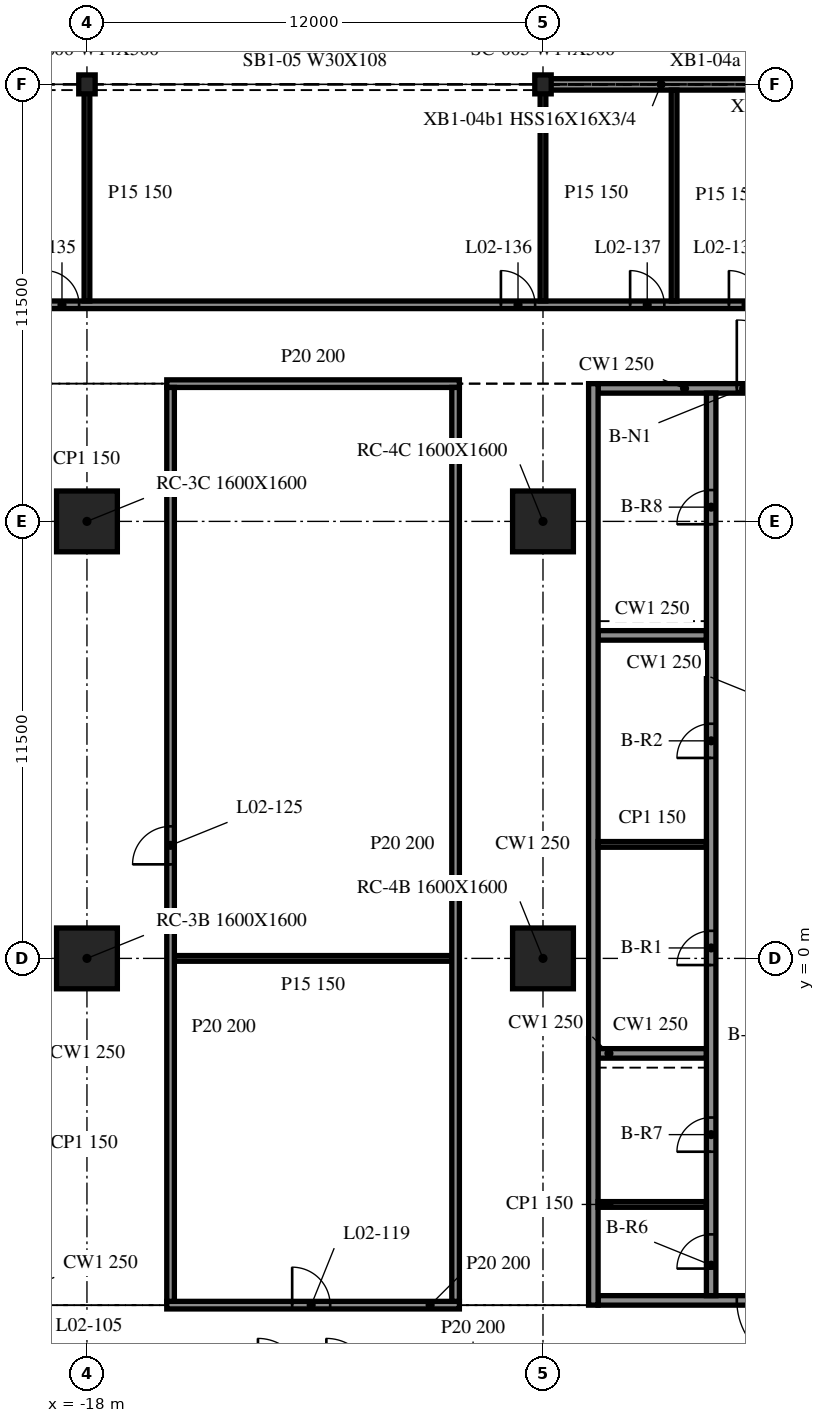
"""IFC4 building model, lengths in metres.
Left out: names, types, materials, properties, quantities, classifications, styles, units other than length and angle.
Written with IfcOpenShell. Run it as: python <this file> out.ifc"""

import sys

from ifc_helpers import new_model, si_unit, direction, frame, frame_2d, origin, origin_2d, place, context, subcontext, project, spatial, rectangle, i_section, extrude, element, fill, save


model = new_model("IFC4")
c1 = context("Model", 3, precision=1e-05, world=origin(), true_north=direction((0.0, 1.0)))
c2 = subcontext(c1, "Body", "Model", "MODEL_VIEW")
j1 = project(units=[si_unit("LENGTHUNIT", "METRE"), si_unit("PLANEANGLEUNIT", "RADIAN")], contexts=[c1])
p1 = place(None, origin())
s1 = spatial("IfcSite", under=j1, at=p1, CompositionType="ELEMENT")
p2 = place(p1, origin())
s2 = spatial("IfcBuilding", under=s1, at=p2, CompositionType="ELEMENT")
p3 = place(p2, frame((0.0, 0.0, 11.5)))
s3 = spatial("IfcBuildingStorey", under=s2, at=p3, CompositionType="ELEMENT", Elevation=11.5)
for number, where, z_axis, x_axis in (
    (1, (-18.0, 0.0, -0.34), (0.0, 0.0, 1.0), (1.0, 0.0, 0.0)),
    (2, (-18.0, 11.5, -0.34), (0.0, 0.0, 1.0), (1.0, 0.0, 0.0)),
    (3, (-6.0, 0.0, -0.34), (0.0, 0.0, 1.0), (1.0, 0.0, 0.0)),
    (4, (-6.0, 11.5, -0.34), (0.0, 0.0, 1.0), (1.0, 0.0, 0.0)),
):
    element("IfcColumn", number, at=place(p3, frame(where, z_axis=z_axis, x_axis=x_axis)), inside=s3, PredefinedType="COLUMN", context=c2, shape_type="SweptSolid", body=[
        extrude(rectangle(XDim=1.6, YDim=1.6, at=origin_2d()), origin(), (0.0, 0.0, 1.0), 4.3),
    ])
for number, where, z_axis, x_axis in (
    (5, (-6.0, 23.0, -0.34), (0.0, 0.0, 1.0), (1.0, 0.0, 0.0)),
    (6, (-18.0, 23.0, -0.34), (0.0, 0.0, 1.0), (1.0, 0.0, 0.0)),
):
    element("IfcColumn", number, at=place(p3, frame(where, z_axis=z_axis, x_axis=x_axis)), inside=s3, PredefinedType="COLUMN", context=c2, shape_type="SweptSolid", body=[
        extrude(i_section(OverallWidth=0.432, OverallDepth=0.498, WebThickness=0.056, FlangeThickness=0.089, at=origin_2d()), origin(), (0.0, 0.0, 1.0), 4.3),
    ])
p4 = place(p3, frame((5.972, 23.0, 0.0), z_axis=(0.0, 0.0, 1.0), x_axis=(-1.0, 0.0, 0.0)))
e7 = element("IfcWall", 7, at=p4, inside=s3, PredefinedType="NOTDEFINED", context=c2, shape_type="SweptSolid", body=[
    extrude(rectangle(XDim=11.944, YDim=0.3, at=frame_2d((5.972, 0.0))), origin(), (0.0, 0.0, 1.0), 3.203),
])
p5 = place(p3, frame((-4.675, 15.125, 0.0), z_axis=(0.0, 0.0, 1.0), x_axis=(0.0, -1.0, 0.0)))
e8 = element("IfcWall", 8, at=p5, inside=s3, PredefinedType="SOLIDWALL", context=c2, shape_type="SweptSolid", body=[
    extrude(rectangle(XDim=24.25, YDim=0.25, at=frame_2d((12.125, 0.0))), origin(), (0.0, 0.0, 1.0), 3.96),
])
p6 = place(p3, frame((4.55, -9.0, 0.0), z_axis=(0.0, 0.0, 1.0), x_axis=(-1.0, 0.0, 0.0)))
e9 = element("IfcWall", 9, at=p6, inside=s3, PredefinedType="SOLIDWALL", context=c2, shape_type="SweptSolid", body=[
    extrude(rectangle(XDim=9.1, YDim=0.25, at=frame_2d((4.55, 0.0))), origin(), (0.0, 0.0, 1.0), 3.96),
])
p7 = place(p6, frame((3.65, 0.0, 0.0)))
e10 = element("IfcOpeningElement", 10, at=p7, cuts=e9, PredefinedType="OPENING", context=c2, shape_type="SweptSolid", body=[
    extrude(rectangle(XDim=1.8, YDim=2.1, at=frame_2d((0.9, 1.05))), frame((0.0, 0.135, 0.0), z_axis=(0.0, -1.0, 0.0), x_axis=(1.0, 0.0, 0.0)), (0.0, 0.0, 1.0), 0.27),
])
p8 = place(p3, frame((-4.55, 15.0, 0.0), z_axis=(0.0, 0.0, 1.0), x_axis=(1.0, 0.0, 0.0)))
e11 = element("IfcWall", 11, at=p8, inside=s3, PredefinedType="SOLIDWALL", context=c2, shape_type="SweptSolid", body=[
    extrude(rectangle(XDim=9.1, YDim=0.25, at=frame_2d((4.55, 0.0))), origin(), (0.0, 0.0, 1.0), 3.96),
])
p9 = place(p8, frame((3.65, 0.0, 0.0)))
e12 = element("IfcOpeningElement", 12, at=p9, cuts=e11, PredefinedType="OPENING", context=c2, shape_type="SweptSolid", body=[
    extrude(rectangle(XDim=1.8, YDim=2.1, at=frame_2d((0.9, 1.05))), frame((0.0, 0.135, 0.0), z_axis=(0.0, -1.0, 0.0), x_axis=(1.0, 0.0, 0.0)), (0.0, 0.0, 1.0), 0.27),
])
p10 = place(p3, frame((-1.575, -8.875, 0.0), z_axis=(0.0, 0.0, 1.0), x_axis=(0.0, 1.0, 0.0)))
e13 = element("IfcWall", 13, at=p10, inside=s3, PredefinedType="SOLIDWALL", context=c2, shape_type="SweptSolid", body=[
    extrude(rectangle(XDim=23.75, YDim=0.25, at=frame_2d((11.875, 0.0))), origin(), (0.0, 0.0, 1.0), 3.96),
])
p11 = place(p10, frame((8.7, 0.0, 0.0)))
e14 = element("IfcOpeningElement", 14, at=p11, cuts=e13, PredefinedType="OPENING", context=c2, shape_type="SweptSolid", body=[
    extrude(rectangle(XDim=0.9, YDim=2.1, at=frame_2d((0.45, 1.05))), frame((0.0, 0.135, 0.0), z_axis=(0.0, -1.0, 0.0), x_axis=(1.0, 0.0, 0.0)), (0.0, 0.0, 1.0), 0.27),
])
p12 = place(p10, frame((14.15, 0.0, 0.0)))
e15 = element("IfcOpeningElement", 15, at=p12, cuts=e13, PredefinedType="OPENING", context=c2, shape_type="SweptSolid", body=[
    extrude(rectangle(XDim=0.9, YDim=2.1, at=frame_2d((0.45, 1.05))), frame((0.0, 0.135, 0.0), z_axis=(0.0, -1.0, 0.0), x_axis=(1.0, 0.0, 0.0)), (0.0, 0.0, 1.0), 0.27),
])
p13 = place(p10, frame((0.712, 0.0, 0.0)))
e16 = element("IfcOpeningElement", 16, at=p13, cuts=e13, PredefinedType="OPENING", context=c2, shape_type="SweptSolid", body=[
    extrude(rectangle(XDim=0.9, YDim=2.1, at=frame_2d((0.45, 1.05))), frame((0.0, 0.135, 0.0), z_axis=(0.0, -1.0, 0.0), x_axis=(1.0, 0.0, 0.0)), (0.0, 0.0, 1.0), 0.27),
])
p14 = place(p10, frame((3.788, 0.0, 0.0)))
e17 = element("IfcOpeningElement", 17, at=p14, cuts=e13, PredefinedType="OPENING", context=c2, shape_type="SweptSolid", body=[
    extrude(rectangle(XDim=0.9, YDim=2.1, at=frame_2d((0.45, 1.05))), frame((0.0, 0.135, 0.0), z_axis=(0.0, -1.0, 0.0), x_axis=(1.0, 0.0, 0.0)), (0.0, 0.0, 1.0), 0.27),
])
p15 = place(p10, frame((20.3, 0.0, 0.0)))
e18 = element("IfcOpeningElement", 18, at=p15, cuts=e13, PredefinedType="OPENING", context=c2, shape_type="SweptSolid", body=[
    extrude(rectangle(XDim=0.9, YDim=2.1, at=frame_2d((0.45, 1.05))), frame((0.0, 0.135, 0.0), z_axis=(0.0, -1.0, 0.0), x_axis=(1.0, 0.0, 0.0)), (0.0, 0.0, 1.0), 0.27),
])
for number, where, z_axis, x_axis in (
    (19, (-4.55, -2.5, 0.0), (0.0, 0.0, 1.0), (1.0, 0.0, 0.0)),
    (20, (-4.55, 8.5, 0.0), (0.0, 0.0, 1.0), (1.0, 0.0, 0.0)),
):
    element("IfcWall", number, at=place(p3, frame(where, z_axis=z_axis, x_axis=x_axis)), inside=s3, PredefinedType="SOLIDWALL", context=c2, shape_type="SweptSolid", body=[
        extrude(rectangle(XDim=2.85, YDim=0.25, at=frame_2d((1.425, 0.0))), origin(), (0.0, 0.0, 1.0), 3.96),
    ])
for number, where, z_axis, x_axis in (
    (21, (-4.55, 3.0, 0.0), (0.0, 0.0, 1.0), (1.0, 0.0, 0.0)),
    (22, (-4.55, -6.475, 0.0), (0.0, 0.0, 1.0), (1.0, 0.0, 0.0)),
):
    element("IfcWall", number, at=place(p3, frame(where, z_axis=z_axis, x_axis=x_axis)), inside=s3, PredefinedType="PARTITIONING", context=c2, shape_type="SweptSolid", body=[
        extrude(rectangle(XDim=2.85, YDim=0.15, at=frame_2d((1.425, 0.0))), origin(), (0.0, 0.0, 1.0), 3.96),
    ])
p16 = place(p3, frame((-15.9, -9.125, 0.0), z_axis=(0.0, 0.0, 1.0), x_axis=(1.0, 0.0, 0.0)))
e23 = element("IfcWall", 23, at=p16, inside=s3, PredefinedType="PARTITIONING", context=c2, shape_type="SweptSolid", body=[
    extrude(rectangle(XDim=7.7, YDim=0.2, at=frame_2d((3.85, 0.0))), origin(), (0.0, 0.0, 1.0), 3.96),
])
p17 = place(p16, frame((3.3, 0.0, 0.0)))
e24 = element("IfcOpeningElement", 24, at=p17, cuts=e23, PredefinedType="OPENING", context=c2, shape_type="SweptSolid", body=[
    extrude(rectangle(XDim=1.0, YDim=2.1, at=frame_2d((0.5, 1.05))), frame((0.0, 0.11, 0.0), z_axis=(0.0, -1.0, 0.0), x_axis=(1.0, 0.0, 0.0)), (0.0, 0.0, 1.0), 0.22),
])
p18 = place(p3, frame((-15.7, 0.0, 0.0), z_axis=(0.0, 0.0, 1.0), x_axis=(1.0, 0.0, 0.0)))
e25 = element("IfcWall", 25, at=p18, inside=s3, PredefinedType="PARTITIONING", context=c2, shape_type="SweptSolid", body=[
    extrude(rectangle(XDim=7.3, YDim=0.15, at=frame_2d((3.65, 0.0))), origin(), (0.0, 0.0, 1.0), 3.96),
])
p19 = place(p3, frame((-15.9, 15.125, 0.0), z_axis=(0.0, 0.0, 1.0), x_axis=(1.0, 0.0, 0.0)))
e26 = element("IfcWall", 26, at=p19, inside=s3, PredefinedType="PARTITIONING", context=c2, shape_type="SweptSolid", body=[
    extrude(rectangle(XDim=7.7, YDim=0.2, at=frame_2d((3.85, 0.0))), origin(), (0.0, 0.0, 1.0), 3.96),
])
p20 = place(p3, frame((-47.807, 17.2, 0.0), z_axis=(0.0, 0.0, 1.0), x_axis=(1.0, 0.0, 0.0)))
e27 = element("IfcWall", 27, at=p20, inside=s3, PredefinedType="PARTITIONING", context=c2, shape_type="SweptSolid", body=[
    extrude(rectangle(XDim=95.615, YDim=0.2, at=frame_2d((47.807, 0.0))), origin(), (0.0, 0.0, 1.0), 3.96),
])
p21 = place(p20, frame((4.7, 0.0, 0.0)))
e28 = element("IfcOpeningElement", 28, at=p21, cuts=e27, PredefinedType="OPENING", context=c2, shape_type="SweptSolid", body=[
    extrude(rectangle(XDim=0.9, YDim=2.1, at=frame_2d((0.45, 1.05))), frame((0.0, 0.11, 0.0), z_axis=(0.0, -1.0, 0.0), x_axis=(1.0, 0.0, 0.0)), (0.0, 0.0, 1.0), 0.22),
])
p22 = place(p20, frame((16.7, 0.0, 0.0)))
e29 = element("IfcOpeningElement", 29, at=p22, cuts=e27, PredefinedType="OPENING", context=c2, shape_type="SweptSolid", body=[
    extrude(rectangle(XDim=0.9, YDim=2.1, at=frame_2d((0.45, 1.05))), frame((0.0, 0.11, 0.0), z_axis=(0.0, -1.0, 0.0), x_axis=(1.0, 0.0, 0.0)), (0.0, 0.0, 1.0), 0.22),
])
p23 = place(p20, frame((20.1, 0.0, 0.0)))
e30 = element("IfcOpeningElement", 30, at=p23, cuts=e27, PredefinedType="OPENING", context=c2, shape_type="SweptSolid", body=[
    extrude(rectangle(XDim=0.9, YDim=2.1, at=frame_2d((0.45, 1.05))), frame((0.0, 0.11, 0.0), z_axis=(0.0, -1.0, 0.0), x_axis=(1.0, 0.0, 0.0)), (0.0, 0.0, 1.0), 0.22),
])
p24 = place(p20, frame((22.7, 0.0, 0.0)))
e31 = element("IfcOpeningElement", 31, at=p24, cuts=e27, PredefinedType="OPENING", context=c2, shape_type="SweptSolid", body=[
    extrude(rectangle(XDim=0.9, YDim=2.1, at=frame_2d((0.45, 1.05))), frame((0.0, 0.11, 0.0), z_axis=(0.0, -1.0, 0.0), x_axis=(1.0, 0.0, 0.0)), (0.0, 0.0, 1.0), 0.22),
])
p25 = place(p20, frame((28.7, 0.0, 0.0)))
e32 = element("IfcOpeningElement", 32, at=p25, cuts=e27, PredefinedType="OPENING", context=c2, shape_type="SweptSolid", body=[
    extrude(rectangle(XDim=0.9, YDim=2.1, at=frame_2d((0.45, 1.05))), frame((0.0, 0.11, 0.0), z_axis=(0.0, -1.0, 0.0), x_axis=(1.0, 0.0, 0.0)), (0.0, 0.0, 1.0), 0.22),
])
p26 = place(p20, frame((40.7, 0.0, 0.0)))
e33 = element("IfcOpeningElement", 33, at=p26, cuts=e27, PredefinedType="OPENING", context=c2, shape_type="SweptSolid", body=[
    extrude(rectangle(XDim=0.9, YDim=2.1, at=frame_2d((0.45, 1.05))), frame((0.0, 0.11, 0.0), z_axis=(0.0, -1.0, 0.0), x_axis=(1.0, 0.0, 0.0)), (0.0, 0.0, 1.0), 0.22),
])
p27 = place(p20, frame((44.1, 0.0, 0.0)))
e34 = element("IfcOpeningElement", 34, at=p27, cuts=e27, PredefinedType="OPENING", context=c2, shape_type="SweptSolid", body=[
    extrude(rectangle(XDim=0.9, YDim=2.1, at=frame_2d((0.45, 1.05))), frame((0.0, 0.11, 0.0), z_axis=(0.0, -1.0, 0.0), x_axis=(1.0, 0.0, 0.0)), (0.0, 0.0, 1.0), 0.22),
])
p28 = place(p20, frame((46.7, 0.0, 0.0)))
e35 = element("IfcOpeningElement", 35, at=p28, cuts=e27, PredefinedType="OPENING", context=c2, shape_type="SweptSolid", body=[
    extrude(rectangle(XDim=0.9, YDim=2.1, at=frame_2d((0.45, 1.05))), frame((0.0, 0.11, 0.0), z_axis=(0.0, -1.0, 0.0), x_axis=(1.0, 0.0, 0.0)), (0.0, 0.0, 1.0), 0.22),
])
p29 = place(p20, frame((48.1, 0.0, 0.0)))
e36 = element("IfcOpeningElement", 36, at=p29, cuts=e27, PredefinedType="OPENING", context=c2, shape_type="SweptSolid", body=[
    extrude(rectangle(XDim=0.9, YDim=2.1, at=frame_2d((0.45, 1.05))), frame((0.0, 0.11, 0.0), z_axis=(0.0, -1.0, 0.0), x_axis=(1.0, 0.0, 0.0)), (0.0, 0.0, 1.0), 0.22),
])
p30 = place(p20, frame((54.1, 0.0, 0.0)))
e37 = element("IfcOpeningElement", 37, at=p30, cuts=e27, PredefinedType="OPENING", context=c2, shape_type="SweptSolid", body=[
    extrude(rectangle(XDim=0.9, YDim=2.1, at=frame_2d((0.45, 1.05))), frame((0.0, 0.11, 0.0), z_axis=(0.0, -1.0, 0.0), x_axis=(1.0, 0.0, 0.0)), (0.0, 0.0, 1.0), 0.22),
])
p31 = place(p20, frame((66.1, 0.0, 0.0)))
e38 = element("IfcOpeningElement", 38, at=p31, cuts=e27, PredefinedType="OPENING", context=c2, shape_type="SweptSolid", body=[
    extrude(rectangle(XDim=0.9, YDim=2.1, at=frame_2d((0.45, 1.05))), frame((0.0, 0.11, 0.0), z_axis=(0.0, -1.0, 0.0), x_axis=(1.0, 0.0, 0.0)), (0.0, 0.0, 1.0), 0.22),
])
p32 = place(p20, frame((69.5, 0.0, 0.0)))
e39 = element("IfcOpeningElement", 39, at=p32, cuts=e27, PredefinedType="OPENING", context=c2, shape_type="SweptSolid", body=[
    extrude(rectangle(XDim=0.9, YDim=2.1, at=frame_2d((0.45, 1.05))), frame((0.0, 0.11, 0.0), z_axis=(0.0, -1.0, 0.0), x_axis=(1.0, 0.0, 0.0)), (0.0, 0.0, 1.0), 0.22),
])
p33 = place(p20, frame((72.1, 0.0, 0.0)))
e40 = element("IfcOpeningElement", 40, at=p33, cuts=e27, PredefinedType="OPENING", context=c2, shape_type="SweptSolid", body=[
    extrude(rectangle(XDim=0.9, YDim=2.1, at=frame_2d((0.45, 1.05))), frame((0.0, 0.11, 0.0), z_axis=(0.0, -1.0, 0.0), x_axis=(1.0, 0.0, 0.0)), (0.0, 0.0, 1.0), 0.22),
])
p34 = place(p20, frame((78.1, 0.0, 0.0)))
e41 = element("IfcOpeningElement", 41, at=p34, cuts=e27, PredefinedType="OPENING", context=c2, shape_type="SweptSolid", body=[
    extrude(rectangle(XDim=0.9, YDim=2.1, at=frame_2d((0.45, 1.05))), frame((0.0, 0.11, 0.0), z_axis=(0.0, -1.0, 0.0), x_axis=(1.0, 0.0, 0.0)), (0.0, 0.0, 1.0), 0.22),
])
p35 = place(p20, frame((90.1, 0.0, 0.0)))
e42 = element("IfcOpeningElement", 42, at=p35, cuts=e27, PredefinedType="OPENING", context=c2, shape_type="SweptSolid", body=[
    extrude(rectangle(XDim=0.9, YDim=2.1, at=frame_2d((0.45, 1.05))), frame((0.0, 0.11, 0.0), z_axis=(0.0, -1.0, 0.0), x_axis=(1.0, 0.0, 0.0)), (0.0, 0.0, 1.0), 0.22),
])
p36 = place(p3, frame((-18.0, 17.3, 0.0), z_axis=(0.0, 0.0, 1.0), x_axis=(0.0, 1.0, 0.0)))
e43 = element("IfcWall", 43, at=p36, inside=s3, PredefinedType="PARTITIONING", context=c2, shape_type="SweptSolid", body=[
    extrude(rectangle(XDim=5.675, YDim=0.15, at=frame_2d((2.837, 0.0))), origin(), (0.0, 0.0, 1.0), 3.96),
])
p37 = place(p3, frame((-15.8, -9.025, 0.0), z_axis=(0.0, 0.0, 1.0), x_axis=(0.0, 1.0, 0.0)))
e44 = element("IfcWall", 44, at=p37, inside=s3, PredefinedType="PARTITIONING", context=c2, shape_type="SweptSolid", body=[
    extrude(rectangle(XDim=24.05, YDim=0.2, at=frame_2d((12.025, 0.0))), origin(), (0.0, 0.0, 1.0), 3.96),
])
p38 = place(p37, frame((11.5, 0.0, 0.0)))
e45 = element("IfcOpeningElement", 45, at=p38, cuts=e44, PredefinedType="OPENING", context=c2, shape_type="SweptSolid", body=[
    extrude(rectangle(XDim=1.0, YDim=2.1, at=frame_2d((0.5, 1.05))), frame((0.0, 0.11, 0.0), z_axis=(0.0, -1.0, 0.0), x_axis=(1.0, 0.0, 0.0)), (0.0, 0.0, 1.0), 0.22),
])
p39 = place(p3, frame((-8.3, -9.025, 0.0), z_axis=(0.0, 0.0, 1.0), x_axis=(0.0, 1.0, 0.0)))
e46 = element("IfcWall", 46, at=p39, inside=s3, PredefinedType="PARTITIONING", context=c2, shape_type="SweptSolid", body=[
    extrude(rectangle(XDim=24.05, YDim=0.2, at=frame_2d((12.025, 0.0))), origin(), (0.0, 0.0, 1.0), 3.96),
])
p40 = place(p3, frame((-6.0, 17.3, 0.0), z_axis=(0.0, 0.0, 1.0), x_axis=(0.0, 1.0, 0.0)))
e47 = element("IfcWall", 47, at=p40, inside=s3, PredefinedType="PARTITIONING", context=c2, shape_type="SweptSolid", body=[
    extrude(rectangle(XDim=5.675, YDim=0.15, at=frame_2d((2.837, 0.0))), origin(), (0.0, 0.0, 1.0), 3.96),
])
p41 = place(p3, frame((-2.55, 17.3, 0.0), z_axis=(0.0, 0.0, 1.0), x_axis=(0.0, 1.0, 0.0)))
e48 = element("IfcWall", 48, at=p41, inside=s3, PredefinedType="PARTITIONING", context=c2, shape_type="SweptSolid", body=[
    extrude(rectangle(XDim=5.55, YDim=0.15, at=frame_2d((2.775, 0.0))), origin(), (0.0, 0.0, 1.0), 3.96),
])
p42 = place(p7, origin())
e49 = element("IfcDoor", 49, at=p42, inside=s3, OperationType="DOUBLE_DOOR_SINGLE_SWING", PredefinedType="DOOR", context=c2, shape_type="SweptSolid", body=[
    extrude(rectangle(XDim=1.8, YDim=2.1, at=frame_2d((0.9, 1.05))), frame((0.0, 0.025, 0.0), z_axis=(0.0, -1.0, 0.0), x_axis=(1.0, 0.0, 0.0)), (0.0, 0.0, 1.0), 0.05),
])
fill(e10, e49)
p43 = place(p9, origin())
e50 = element("IfcDoor", 50, at=p43, inside=s3, OperationType="DOUBLE_DOOR_SINGLE_SWING", PredefinedType="DOOR", context=c2, shape_type="SweptSolid", body=[
    extrude(rectangle(XDim=1.8, YDim=2.1, at=frame_2d((0.9, 1.05))), frame((0.0, 0.025, 0.0), z_axis=(0.0, -1.0, 0.0), x_axis=(1.0, 0.0, 0.0)), (0.0, 0.0, 1.0), 0.05),
])
fill(e12, e50)
p44 = place(p11, origin())
e51 = element("IfcDoor", 51, at=p44, inside=s3, OperationType="SINGLE_SWING_LEFT", PredefinedType="DOOR", context=c2, shape_type="SweptSolid", body=[
    extrude(rectangle(XDim=0.9, YDim=2.1, at=frame_2d((0.45, 1.05))), frame((0.0, 0.025, 0.0), z_axis=(0.0, -1.0, 0.0), x_axis=(1.0, 0.0, 0.0)), (0.0, 0.0, 1.0), 0.05),
])
fill(e14, e51)
p45 = place(p12, origin())
e52 = element("IfcDoor", 52, at=p45, inside=s3, OperationType="SINGLE_SWING_RIGHT", PredefinedType="DOOR", context=c2, shape_type="SweptSolid", body=[
    extrude(rectangle(XDim=0.9, YDim=2.1, at=frame_2d((0.45, 1.05))), frame((0.0, 0.025, 0.0), z_axis=(0.0, -1.0, 0.0), x_axis=(1.0, 0.0, 0.0)), (0.0, 0.0, 1.0), 0.05),
])
fill(e15, e52)
p46 = place(p13, origin())
e53 = element("IfcDoor", 53, at=p46, inside=s3, OperationType="SINGLE_SWING_RIGHT", PredefinedType="DOOR", context=c2, shape_type="SweptSolid", body=[
    extrude(rectangle(XDim=0.9, YDim=2.1, at=frame_2d((0.45, 1.05))), frame((0.0, 0.025, 0.0), z_axis=(0.0, -1.0, 0.0), x_axis=(1.0, 0.0, 0.0)), (0.0, 0.0, 1.0), 0.05),
])
fill(e16, e53)
p47 = place(p14, origin())
e54 = element("IfcDoor", 54, at=p47, inside=s3, OperationType="SINGLE_SWING_LEFT", PredefinedType="DOOR", context=c2, shape_type="SweptSolid", body=[
    extrude(rectangle(XDim=0.9, YDim=2.1, at=frame_2d((0.45, 1.05))), frame((0.0, 0.025, 0.0), z_axis=(0.0, -1.0, 0.0), x_axis=(1.0, 0.0, 0.0)), (0.0, 0.0, 1.0), 0.05),
])
fill(e17, e54)
p48 = place(p15, origin())
e55 = element("IfcDoor", 55, at=p48, inside=s3, OperationType="SINGLE_SWING_RIGHT", PredefinedType="DOOR", context=c2, shape_type="SweptSolid", body=[
    extrude(rectangle(XDim=0.9, YDim=2.1, at=frame_2d((0.45, 1.05))), frame((0.0, 0.025, 0.0), z_axis=(0.0, -1.0, 0.0), x_axis=(1.0, 0.0, 0.0)), (0.0, 0.0, 1.0), 0.05),
])
fill(e18, e55)
p49 = place(p17, origin())
e56 = element("IfcDoor", 56, at=p49, inside=s3, OperationType="SINGLE_SWING_LEFT", PredefinedType="DOOR", context=c2, shape_type="SweptSolid", body=[
    extrude(rectangle(XDim=1.0, YDim=2.1, at=frame_2d((0.5, 1.05))), frame((0.0, 0.025, 0.0), z_axis=(0.0, -1.0, 0.0), x_axis=(1.0, 0.0, 0.0)), (0.0, 0.0, 1.0), 0.05),
])
fill(e24, e56)
p50 = place(p38, origin())
e57 = element("IfcDoor", 57, at=p50, inside=s3, OperationType="SINGLE_SWING_RIGHT", PredefinedType="DOOR", context=c2, shape_type="SweptSolid", body=[
    extrude(rectangle(XDim=1.0, YDim=2.1, at=frame_2d((0.5, 1.05))), frame((0.0, 0.025, 0.0), z_axis=(0.0, -1.0, 0.0), x_axis=(1.0, 0.0, 0.0)), (0.0, 0.0, 1.0), 0.05),
])
fill(e45, e57)
p51 = place(p25, origin())
e58 = element("IfcDoor", 58, at=p51, inside=s3, OperationType="SINGLE_SWING_LEFT", PredefinedType="DOOR", context=c2, shape_type="SweptSolid", body=[
    extrude(rectangle(XDim=0.9, YDim=2.1, at=frame_2d((0.45, 1.05))), frame((0.0, 0.025, 0.0), z_axis=(0.0, -1.0, 0.0), x_axis=(1.0, 0.0, 0.0)), (0.0, 0.0, 1.0), 0.05),
])
fill(e32, e58)
p52 = place(p26, origin())
e59 = element("IfcDoor", 59, at=p52, inside=s3, OperationType="SINGLE_SWING_LEFT", PredefinedType="DOOR", context=c2, shape_type="SweptSolid", body=[
    extrude(rectangle(XDim=0.9, YDim=2.1, at=frame_2d((0.45, 1.05))), frame((0.0, 0.025, 0.0), z_axis=(0.0, -1.0, 0.0), x_axis=(1.0, 0.0, 0.0)), (0.0, 0.0, 1.0), 0.05),
])
fill(e33, e59)
p53 = place(p27, origin())
e60 = element("IfcDoor", 60, at=p53, inside=s3, OperationType="SINGLE_SWING_LEFT", PredefinedType="DOOR", context=c2, shape_type="SweptSolid", body=[
    extrude(rectangle(XDim=0.9, YDim=2.1, at=frame_2d((0.45, 1.05))), frame((0.0, 0.025, 0.0), z_axis=(0.0, -1.0, 0.0), x_axis=(1.0, 0.0, 0.0)), (0.0, 0.0, 1.0), 0.05),
])
fill(e34, e60)
p54 = place(p28, origin())
e61 = element("IfcDoor", 61, at=p54, inside=s3, OperationType="SINGLE_SWING_LEFT", PredefinedType="DOOR", context=c2, shape_type="SweptSolid", body=[
    extrude(rectangle(XDim=0.9, YDim=2.1, at=frame_2d((0.45, 1.05))), frame((0.0, 0.025, 0.0), z_axis=(0.0, -1.0, 0.0), x_axis=(1.0, 0.0, 0.0)), (0.0, 0.0, 1.0), 0.05),
])
fill(e35, e61)
save(model, sys.argv[1])
